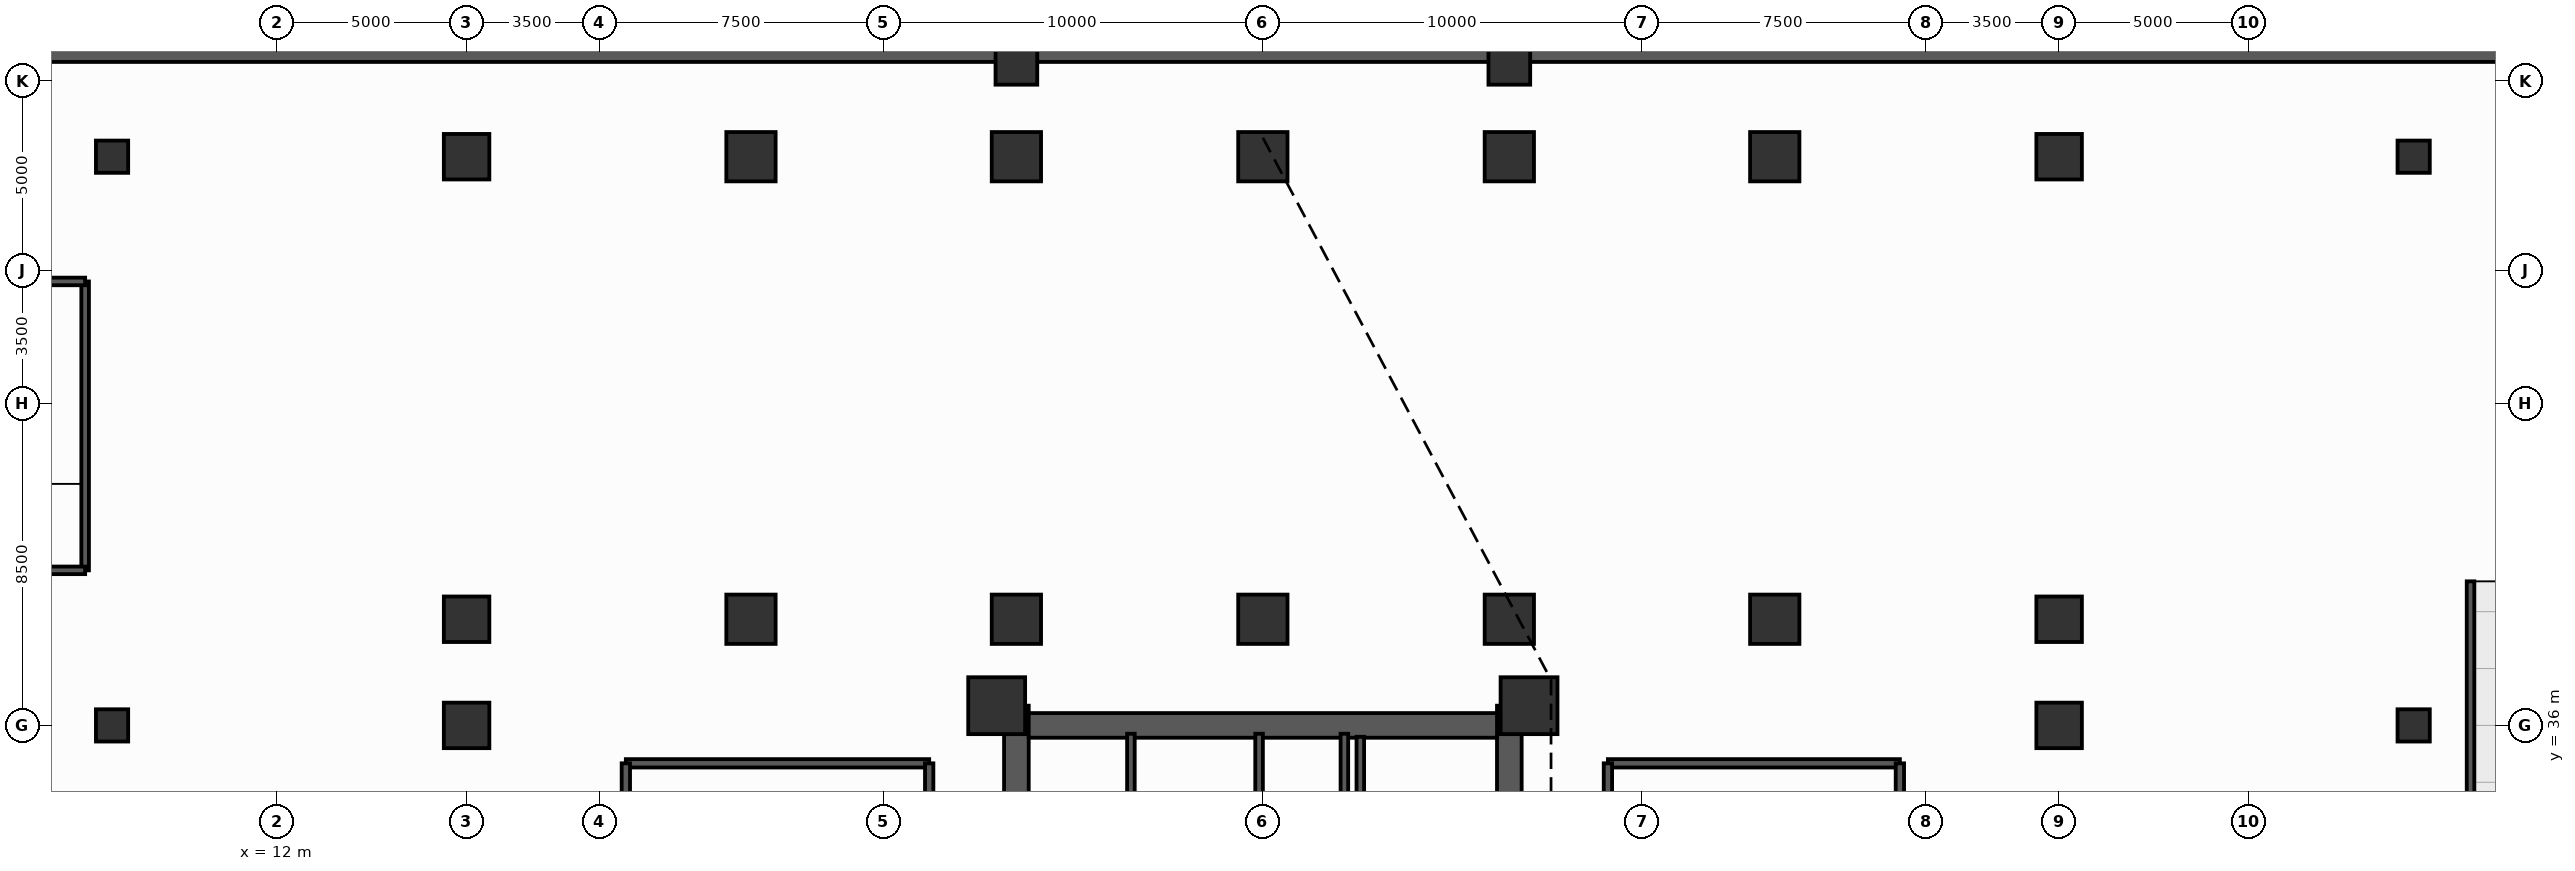
"""IFC4 building model, lengths in metres.
Left out: names, types, materials, properties, quantities, classifications, styles, units other than length and angle.
Written with IfcOpenShell. Run it as: python <this file> out.ifc"""

import sys

from ifc_helpers import new_model, si_unit, direction, frame, frame_2d, origin, origin_2d, place, context, subcontext, project, spatial, rectangle, circle, extrude, source, transform, mapped, element, fill, save


model = new_model("IFC4")
c1 = context("Model", 3, precision=1e-05, world=origin(), true_north=direction((0.0, 1.0)))
c2 = subcontext(c1, "Body", "Model", "MODEL_VIEW")
j1 = project(units=[si_unit("LENGTHUNIT", "METRE"), si_unit("PLANEANGLEUNIT", "RADIAN")], contexts=[c1])
p1 = place(None, origin())
s1 = spatial("IfcSite", under=j1, at=p1, CompositionType="ELEMENT")
p2 = place(p1, origin())
s2 = spatial("IfcBuilding", under=s1, at=p2, CompositionType="ELEMENT")
p3 = place(p2, frame((0.0, 0.0, -9.2)))
s3 = spatial("IfcBuildingStorey", under=s2, at=p3, CompositionType="ELEMENT", Elevation=-9.2)
p4 = place(p3, frame((75.75, 53.75, 0.0), z_axis=(0.0, 0.0, 1.0), x_axis=(-1.0, 0.0, 0.0)))
e1 = element("IfcWall", 1, at=p4, inside=s3, PredefinedType="USERDEFINED", context=c2, shape_type="SweptSolid", body=[
    extrude(rectangle(XDim=75.5, YDim=0.5, at=frame_2d((37.75, 0.0))), origin(), (0.0, 0.0, 1.0), 4.6),
])
p5 = place(p3, frame((31.5, 17.48, 0.0), z_axis=(0.0, 0.0, 1.0), x_axis=(0.0, 1.0, 0.0)))
e2 = element("IfcWall", 2, at=p5, inside=s3, PredefinedType="SHEAR", context=c2, shape_type="SweptSolid", body=[
    extrude(rectangle(XDim=19.04, YDim=0.65, at=frame_2d((9.52, 0.0))), origin(), (0.0, 0.0, 1.0), 4.6),
])
p6 = place(p5, frame((6.32, 0.0, 0.0)))
e3 = element("IfcOpeningElement", 3, at=p6, cuts=e2, PredefinedType="OPENING", context=c2, shape_type="SweptSolid", body=[
    extrude(rectangle(XDim=1.1, YDim=2.15, at=frame_2d((0.55, 1.075))), frame((0.0, 0.337, 0.0), z_axis=(0.0, -1.0, 0.0), x_axis=(1.0, 0.0, 0.0)), (0.0, 0.0, 1.0), 0.674),
])
p7 = place(p3, frame((44.5, 17.48, 0.0), z_axis=(0.0, 0.0, 1.0), x_axis=(0.0, 1.0, 0.0)))
e4 = element("IfcWall", 4, at=p7, inside=s3, PredefinedType="SHEAR", context=c2, shape_type="SweptSolid", body=[
    extrude(rectangle(XDim=19.04, YDim=0.65, at=frame_2d((9.52, 0.0))), origin(), (0.0, 0.0, 1.0), 4.6),
])
p8 = place(p7, frame((12.67, 0.0, 0.0), z_axis=(0.0, 0.0, 1.0), x_axis=(-1.0, 0.0, 0.0)))
e5 = element("IfcOpeningElement", 5, at=p8, cuts=e4, PredefinedType="OPENING", context=c2, shape_type="SweptSolid", body=[
    extrude(rectangle(XDim=1.1, YDim=2.15, at=frame_2d((0.55, 1.075))), frame((0.0, 0.337, 0.0), z_axis=(0.0, -1.0, 0.0), x_axis=(1.0, 0.0, 0.0)), (0.0, 0.0, 1.0), 0.674),
])
p9 = place(p3, frame((31.825, 36.0, 0.0), z_axis=(0.0, 0.0, 1.0), x_axis=(1.0, 0.0, 0.0)))
e6 = element("IfcWall", 6, at=p9, inside=s3, PredefinedType="SHEAR", context=c2, shape_type="SweptSolid", body=[
    extrude(rectangle(XDim=12.35, YDim=0.65, at=frame_2d((6.175, 0.0))), origin(), (0.0, 0.0, 1.0), 4.6),
])
p10 = place(p9, frame((5.125, 0.0, 0.0), z_axis=(0.0, 0.0, 1.0), x_axis=(-1.0, 0.0, 0.0)))
e7 = element("IfcOpeningElement", 7, at=p10, cuts=e6, PredefinedType="OPENING", context=c2, shape_type="SweptSolid", body=[
    extrude(rectangle(XDim=1.4, YDim=2.15, at=frame_2d((0.7, 1.075))), frame((0.0, 0.337, 0.0), z_axis=(0.0, -1.0, 0.0), x_axis=(1.0, 0.0, 0.0)), (0.0, 0.0, 1.0), 0.674),
])
m1 = source(origin(), c2, "Body", "SweptSolid", [
    extrude(rectangle(XDim=1.5, YDim=1.5, at=origin_2d()), origin(), (0.0, 0.0, 1.0), 4.6),
])
for number, where, z_axis, x_axis in (
    (8, (30.98, 36.52, 0.0), (0.0, 0.0, 1.0), (1.0, 0.0, 0.0)),
    (9, (45.02, 36.52, 0.0), (0.0, 0.0, 1.0), (1.0, 0.0, 0.0)),
):
    element("IfcColumn", number, at=place(p3, frame(where, z_axis=z_axis, x_axis=x_axis)), inside=s3, PredefinedType="COLUMN", context=c2, shape_type="MappedRepresentation", body=[
        mapped(m1, transform((0.0, 0.0, 0.0), scale=1.0)),
    ])
m2 = source(origin(), c2, "Body", "SweptSolid", [
    extrude(circle(Radius=0.425, at=origin_2d()), origin(), (0.0, 0.0, 1.0), 4.6),
])
for number, where, z_axis, x_axis in (
    (10, (7.65, 36.0, 0.0), (0.0, 0.0, 1.0), (1.0, 0.0, 0.0)),
    (11, (68.35, 36.0, 0.0), (0.0, 0.0, 1.0), (1.0, 0.0, 0.0)),
    (12, (7.65, 51.0, 0.0), (0.0, 0.0, 1.0), (1.0, 0.0, 0.0)),
    (13, (68.35, 51.0, 0.0), (0.0, 0.0, 1.0), (1.0, 0.0, 0.0)),
):
    element("IfcColumn", number, at=place(p3, frame(where, z_axis=z_axis, x_axis=x_axis)), inside=s3, PredefinedType="COLUMN", context=c2, shape_type="MappedRepresentation", body=[
        mapped(m2, transform((0.0, 0.0, 0.0), scale=1.0)),
    ])
m3 = source(origin(), c2, "Body", "SweptSolid", [
    extrude(rectangle(XDim=1.2, YDim=1.2, at=origin_2d()), origin(), (0.0, 0.0, 1.0), 4.6),
])
for number, where, z_axis, x_axis in (
    (14, (17.0, 36.0, 0.0), (0.0, 0.0, 1.0), (1.0, 0.0, 0.0)),
    (15, (59.0, 36.0, 0.0), (0.0, 0.0, 1.0), (1.0, 0.0, 0.0)),
    (16, (17.0, 38.8, 0.0), (0.0, 0.0, 1.0), (1.0, 0.0, 0.0)),
    (17, (59.0, 38.8, 0.0), (0.0, 0.0, 1.0), (1.0, 0.0, 0.0)),
    (18, (17.0, 51.0, 0.0), (0.0, 0.0, 1.0), (1.0, 0.0, 0.0)),
    (19, (59.0, 51.0, 0.0), (0.0, 0.0, 1.0), (1.0, 0.0, 0.0)),
):
    element("IfcColumn", number, at=place(p3, frame(where, z_axis=z_axis, x_axis=x_axis)), inside=s3, PredefinedType="COLUMN", context=c2, shape_type="MappedRepresentation", body=[
        mapped(m3, transform((0.0, 0.0, 0.0), scale=1.0)),
    ])
m4 = source(origin(), c2, "Body", "SweptSolid", [
    extrude(rectangle(XDim=1.3, YDim=1.3, at=origin_2d()), origin(), (0.0, 0.0, 1.0), 4.6),
])
for number, where, z_axis, x_axis in (
    (20, (24.5, 38.8, 0.0), (0.0, 0.0, 1.0), (1.0, 0.0, 0.0)),
    (21, (24.5, 51.0, 0.0), (0.0, 0.0, 1.0), (1.0, 0.0, 0.0)),
    (22, (31.5, 38.8, 0.0), (0.0, 0.0, 1.0), (1.0, 0.0, 0.0)),
    (23, (31.5, 51.0, 0.0), (0.0, 0.0, 1.0), (1.0, 0.0, 0.0)),
):
    element("IfcColumn", number, at=place(p3, frame(where, z_axis=z_axis, x_axis=x_axis)), inside=s3, PredefinedType="COLUMN", context=c2, shape_type="MappedRepresentation", body=[
        mapped(m4, transform((0.0, 0.0, 0.0), scale=1.0)),
    ])
m5 = source(origin(), c2, "Body", "SweptSolid", [
    extrude(rectangle(XDim=1.1, YDim=1.1, at=origin_2d()), origin(), (0.0, 0.0, 1.0), 4.6),
])
p11 = place(p3, frame((31.5, 53.45, 0.0), z_axis=(0.0, 0.0, 1.0), x_axis=(1.0, 0.0, 0.0)))
e24 = element("IfcColumn", 24, at=p11, inside=s3, PredefinedType="COLUMN", context=c2, shape_type="MappedRepresentation", body=[
    mapped(m5, transform((0.0, 0.0, 0.0), scale=1.0)),
])
for number, where, z_axis, x_axis in (
    (25, (38.0, 38.8, 0.0), (0.0, 0.0, 1.0), (1.0, 0.0, 0.0)),
    (26, (38.0, 51.0, 0.0), (0.0, 0.0, 1.0), (1.0, 0.0, 0.0)),
    (27, (44.5, 38.8, 0.0), (0.0, 0.0, 1.0), (1.0, 0.0, 0.0)),
    (28, (44.5, 51.0, 0.0), (0.0, 0.0, 1.0), (1.0, 0.0, 0.0)),
):
    element("IfcColumn", number, at=place(p3, frame(where, z_axis=z_axis, x_axis=x_axis)), inside=s3, PredefinedType="COLUMN", context=c2, shape_type="MappedRepresentation", body=[
        mapped(m4, transform((0.0, 0.0, 0.0), scale=1.0)),
    ])
p12 = place(p3, frame((44.5, 53.45, 0.0), z_axis=(0.0, 0.0, 1.0), x_axis=(1.0, 0.0, 0.0)))
e29 = element("IfcColumn", 29, at=p12, inside=s3, PredefinedType="COLUMN", context=c2, shape_type="MappedRepresentation", body=[
    mapped(m5, transform((0.0, 0.0, 0.0), scale=1.0)),
])
for number, where, z_axis, x_axis in (
    (30, (51.5, 38.8, 0.0), (0.0, 0.0, 1.0), (1.0, 0.0, 0.0)),
    (31, (51.5, 51.0, 0.0), (0.0, 0.0, 1.0), (1.0, 0.0, 0.0)),
):
    element("IfcColumn", number, at=place(p3, frame(where, z_axis=z_axis, x_axis=x_axis)), inside=s3, PredefinedType="COLUMN", context=c2, shape_type="MappedRepresentation", body=[
        mapped(m4, transform((0.0, 0.0, 0.0), scale=1.0)),
    ])
p13 = place(p3, frame((40.15, 31.8, 0.0), z_axis=(0.0, 0.0, 1.0), x_axis=(0.0, 1.0, 0.0)))
e32 = element("IfcWall", 32, at=p13, inside=s3, PredefinedType="PARTITIONING", context=c2, shape_type="SweptSolid", body=[
    extrude(rectangle(XDim=3.98, YDim=0.2, at=frame_2d((1.99, 0.0))), origin(), (0.0, 0.0, 1.0), 4.3),
])
p14 = place(p3, frame((40.57, 28.65, 0.0), z_axis=(0.0, 0.0, 1.0), x_axis=(0.0, 1.0, 0.0)))
e33 = element("IfcWall", 33, at=p14, inside=s3, PredefinedType="SOLIDWALL", context=c2, shape_type="SweptSolid", body=[
    extrude(rectangle(XDim=7.05, YDim=0.2, at=frame_2d((3.525, 0.0))), origin(), (0.0, 0.0, 1.0), 4.3),
])
p15 = place(p3, frame((34.52, 25.44, 0.0), z_axis=(0.0, 0.0, 1.0), x_axis=(0.0, 1.0, 0.0)))
e34 = element("IfcWall", 34, at=p15, inside=s3, PredefinedType="PARTITIONING", context=c2, shape_type="SweptSolid", body=[
    extrude(rectangle(XDim=10.34, YDim=0.2, at=frame_2d((5.17, 0.0))), origin(), (0.0, 0.0, 1.0), 4.3),
])
p16 = place(p15, frame((0.32, 0.0, 0.0)))
e35 = element("IfcOpeningElement", 35, at=p16, cuts=e34, PredefinedType="OPENING", context=c2, shape_type="SweptSolid", body=[
    extrude(rectangle(XDim=1.0, YDim=2.15, at=frame_2d((0.5, 1.075))), frame((0.0, 0.112, 0.0), z_axis=(0.0, -1.0, 0.0), x_axis=(1.0, 0.0, 0.0)), (0.0, 0.0, 1.0), 0.224),
])
p17 = place(p15, frame((1.71, 0.0, 0.0)))
e36 = element("IfcOpeningElement", 36, at=p17, cuts=e34, PredefinedType="OPENING", context=c2, shape_type="SweptSolid", body=[
    extrude(rectangle(XDim=1.0, YDim=2.15, at=frame_2d((0.5, 1.075))), frame((0.0, 0.112, 0.0), z_axis=(0.0, -1.0, 0.0), x_axis=(1.0, 0.0, 0.0)), (0.0, 0.0, 1.0), 0.224),
])
p18 = place(p15, frame((3.535, 0.0, 0.0)))
e37 = element("IfcOpeningElement", 37, at=p18, cuts=e34, PredefinedType="OPENING", context=c2, shape_type="SweptSolid", body=[
    extrude(rectangle(XDim=1.0, YDim=2.15, at=frame_2d((0.5, 1.075))), frame((0.0, 0.112, 0.0), z_axis=(0.0, -1.0, 0.0), x_axis=(1.0, 0.0, 0.0)), (0.0, 0.0, 1.0), 0.224),
])
p19 = place(p15, frame((5.135, 0.0, 0.0)))
e38 = element("IfcOpeningElement", 38, at=p19, cuts=e34, PredefinedType="OPENING", context=c2, shape_type="SweptSolid", body=[
    extrude(rectangle(XDim=1.0, YDim=2.15, at=frame_2d((0.5, 1.075))), frame((0.0, 0.112, 0.0), z_axis=(0.0, -1.0, 0.0), x_axis=(1.0, 0.0, 0.0)), (0.0, 0.0, 1.0), 0.224),
])
p20 = place(p15, frame((7.01, 0.0, 0.0)))
e39 = element("IfcOpeningElement", 39, at=p20, cuts=e34, PredefinedType="OPENING", context=c2, shape_type="SweptSolid", body=[
    extrude(rectangle(XDim=1.0, YDim=2.15, at=frame_2d((0.5, 1.075))), frame((0.0, 0.112, 0.0), z_axis=(0.0, -1.0, 0.0), x_axis=(1.0, 0.0, 0.0)), (0.0, 0.0, 1.0), 0.224),
])
p21 = place(p15, frame((8.76, 0.0, 0.0)))
e40 = element("IfcOpeningElement", 40, at=p21, cuts=e34, PredefinedType="OPENING", context=c2, shape_type="SweptSolid", body=[
    extrude(rectangle(XDim=1.0, YDim=2.15, at=frame_2d((0.5, 1.075))), frame((0.0, 0.112, 0.0), z_axis=(0.0, -1.0, 0.0), x_axis=(1.0, 0.0, 0.0)), (0.0, 0.0, 1.0), 0.224),
])
p22 = place(p3, frame((37.9, 25.44, 0.0), z_axis=(0.0, 0.0, 1.0), x_axis=(0.0, 1.0, 0.0)))
e41 = element("IfcWall", 41, at=p22, inside=s3, PredefinedType="PARTITIONING", context=c2, shape_type="SweptSolid", body=[
    extrude(rectangle(XDim=10.34, YDim=0.2, at=frame_2d((5.17, 0.0))), origin(), (0.0, 0.0, 1.0), 4.3),
])
p23 = place(p22, frame((0.32, 0.0, 0.0)))
e42 = element("IfcOpeningElement", 42, at=p23, cuts=e41, PredefinedType="OPENING", context=c2, shape_type="SweptSolid", body=[
    extrude(rectangle(XDim=1.0, YDim=2.15, at=frame_2d((0.5, 1.075))), frame((0.0, 0.112, 0.0), z_axis=(0.0, -1.0, 0.0), x_axis=(1.0, 0.0, 0.0)), (0.0, 0.0, 1.0), 0.224),
])
p24 = place(p22, frame((1.71, 0.0, 0.0)))
e43 = element("IfcOpeningElement", 43, at=p24, cuts=e41, PredefinedType="OPENING", context=c2, shape_type="SweptSolid", body=[
    extrude(rectangle(XDim=1.0, YDim=2.15, at=frame_2d((0.5, 1.075))), frame((0.0, 0.112, 0.0), z_axis=(0.0, -1.0, 0.0), x_axis=(1.0, 0.0, 0.0)), (0.0, 0.0, 1.0), 0.224),
])
p25 = place(p22, frame((3.51, 0.0, 0.0)))
e44 = element("IfcOpeningElement", 44, at=p25, cuts=e41, PredefinedType="OPENING", context=c2, shape_type="SweptSolid", body=[
    extrude(rectangle(XDim=1.0, YDim=2.15, at=frame_2d((0.5, 1.075))), frame((0.0, 0.112, 0.0), z_axis=(0.0, -1.0, 0.0), x_axis=(1.0, 0.0, 0.0)), (0.0, 0.0, 1.0), 0.224),
])
p26 = place(p22, frame((5.01, 0.0, 0.0)))
e45 = element("IfcOpeningElement", 45, at=p26, cuts=e41, PredefinedType="OPENING", context=c2, shape_type="SweptSolid", body=[
    extrude(rectangle(XDim=1.0, YDim=2.15, at=frame_2d((0.5, 1.075))), frame((0.0, 0.112, 0.0), z_axis=(0.0, -1.0, 0.0), x_axis=(1.0, 0.0, 0.0)), (0.0, 0.0, 1.0), 0.224),
])
p27 = place(p22, frame((6.86, 0.0, 0.0)))
e46 = element("IfcOpeningElement", 46, at=p27, cuts=e41, PredefinedType="OPENING", context=c2, shape_type="SweptSolid", body=[
    extrude(rectangle(XDim=1.0, YDim=2.15, at=frame_2d((0.5, 1.075))), frame((0.0, 0.112, 0.0), z_axis=(0.0, -1.0, 0.0), x_axis=(1.0, 0.0, 0.0)), (0.0, 0.0, 1.0), 0.224),
])
p28 = place(p22, frame((8.71, 0.0, 0.0)))
e47 = element("IfcOpeningElement", 47, at=p28, cuts=e41, PredefinedType="OPENING", context=c2, shape_type="SweptSolid", body=[
    extrude(rectangle(XDim=1.0, YDim=2.15, at=frame_2d((0.5, 1.075))), frame((0.0, 0.112, 0.0), z_axis=(0.0, -1.0, 0.0), x_axis=(1.0, 0.0, 0.0)), (0.0, 0.0, 1.0), 0.224),
])
p29 = place(p3, frame((6.94, 40.09, 0.0), z_axis=(0.0, 0.0, 1.0), x_axis=(0.0, 1.0, 0.0)))
e48 = element("IfcWall", 48, at=p29, inside=s3, PredefinedType="SOLIDWALL", context=c2, shape_type="SweptSolid", body=[
    extrude(rectangle(XDim=7.62, YDim=0.2, at=frame_2d((3.81, 0.0))), origin(), (0.0, 0.0, 1.0), 4.3),
])
p30 = place(p29, frame((7.15, 0.0, 0.0), z_axis=(0.0, 0.0, 1.0), x_axis=(-1.0, 0.0, 0.0)))
e49 = element("IfcOpeningElement", 49, at=p30, cuts=e48, PredefinedType="OPENING", context=c2, shape_type="SweptSolid", body=[
    extrude(rectangle(XDim=1.1, YDim=2.15, at=frame_2d((0.55, 1.075))), frame((0.0, 0.112, 0.0), z_axis=(0.0, -1.0, 0.0), x_axis=(1.0, 0.0, 0.0)), (0.0, 0.0, 1.0), 0.224),
])
for number, where, z_axis, x_axis in (
    (50, (3.24, 40.09, 0.0), (0.0, 0.0, 1.0), (1.0, 0.0, 0.0)),
    (51, (3.24, 47.71, 0.0), (0.0, 0.0, 1.0), (1.0, 0.0, 0.0)),
):
    element("IfcWall", number, at=place(p3, frame(where, z_axis=z_axis, x_axis=x_axis)), inside=s3, PredefinedType="SOLIDWALL", context=c2, shape_type="SweptSolid", body=[
        extrude(rectangle(XDim=3.7, YDim=0.2, at=frame_2d((1.85, 0.0))), origin(), (0.0, 0.0, 1.0), 4.3),
    ])
p31 = place(p3, frame((69.85, 8.2, 0.0), z_axis=(0.0, 0.0, 1.0), x_axis=(0.0, 1.0, 0.0)))
e52 = element("IfcWall", 52, at=p31, inside=s3, PredefinedType="PARTITIONING", context=c2, shape_type="SweptSolid", body=[
    extrude(rectangle(XDim=31.6, YDim=0.2, at=frame_2d((15.8, 0.0))), origin(), (0.0, 0.0, 1.0), 4.3),
])
p32 = place(p3, frame((21.2, 35.0, 0.0), z_axis=(0.0, 0.0, 1.0), x_axis=(1.0, 0.0, 0.0)))
e53 = element("IfcWall", 53, at=p32, inside=s3, PredefinedType="PARTITIONING", context=c2, shape_type="SweptSolid", body=[
    extrude(rectangle(XDim=8.0, YDim=0.22, at=frame_2d((4.0, 0.0))), origin(), (0.0, 0.0, 1.0), 4.3),
])
p33 = place(p3, frame((21.2, 27.4, 0.0), z_axis=(0.0, 0.0, 1.0), x_axis=(0.0, 1.0, 0.0)))
e54 = element("IfcWall", 54, at=p33, inside=s3, PredefinedType="PARTITIONING", context=c2, shape_type="SweptSolid", body=[
    extrude(rectangle(XDim=7.6, YDim=0.22, at=frame_2d((3.8, 0.0))), origin(), (0.0, 0.0, 1.0), 4.3),
])
p34 = place(p33, frame((3.25, 0.0, 0.0)))
e55 = element("IfcOpeningElement", 55, at=p34, cuts=e54, PredefinedType="OPENING", context=c2, shape_type="SweptSolid", body=[
    extrude(rectangle(XDim=1.1, YDim=2.15, at=frame_2d((0.55, 1.075))), frame((0.0, 0.122, 0.0), z_axis=(0.0, -1.0, 0.0), x_axis=(1.0, 0.0, 0.0)), (0.0, 0.0, 1.0), 0.244),
])
p35 = place(p3, frame((29.2, 27.4, 0.0), z_axis=(0.0, 0.0, 1.0), x_axis=(0.0, 1.0, 0.0)))
e56 = element("IfcWall", 56, at=p35, inside=s3, PredefinedType="PARTITIONING", context=c2, shape_type="SweptSolid", body=[
    extrude(rectangle(XDim=7.6, YDim=0.22, at=frame_2d((3.8, 0.0))), origin(), (0.0, 0.0, 1.0), 4.3),
])
p36 = place(p3, frame((47.1, 35.0, 0.0), z_axis=(0.0, 0.0, 1.0), x_axis=(1.0, 0.0, 0.0)))
e57 = element("IfcWall", 57, at=p36, inside=s3, PredefinedType="PARTITIONING", context=c2, shape_type="SweptSolid", body=[
    extrude(rectangle(XDim=7.7, YDim=0.22, at=frame_2d((3.85, 0.0))), origin(), (0.0, 0.0, 1.0), 4.3),
])
p37 = place(p3, frame((47.1, 27.4, 0.0), z_axis=(0.0, 0.0, 1.0), x_axis=(0.0, 1.0, 0.0)))
e58 = element("IfcWall", 58, at=p37, inside=s3, PredefinedType="PARTITIONING", context=c2, shape_type="SweptSolid", body=[
    extrude(rectangle(XDim=7.6, YDim=0.22, at=frame_2d((3.8, 0.0))), origin(), (0.0, 0.0, 1.0), 4.3),
])
p38 = place(p3, frame((54.8, 27.4, 0.0), z_axis=(0.0, 0.0, 1.0), x_axis=(0.0, 1.0, 0.0)))
e59 = element("IfcWall", 59, at=p38, inside=s3, PredefinedType="PARTITIONING", context=c2, shape_type="SweptSolid", body=[
    extrude(rectangle(XDim=7.6, YDim=0.22, at=frame_2d((3.8, 0.0))), origin(), (0.0, 0.0, 1.0), 4.3),
])
p39 = place(p38, frame((3.25, 0.0, 0.0)))
e60 = element("IfcOpeningElement", 60, at=p39, cuts=e59, PredefinedType="OPENING", context=c2, shape_type="SweptSolid", body=[
    extrude(rectangle(XDim=1.1, YDim=2.15, at=frame_2d((0.55, 1.075))), frame((0.0, 0.122, 0.0), z_axis=(0.0, -1.0, 0.0), x_axis=(1.0, 0.0, 0.0)), (0.0, 0.0, 1.0), 0.244),
])
m6 = source(origin(), c2, "Body", "SweptSolid", [
    extrude(rectangle(XDim=1.4, YDim=2.15, at=frame_2d((0.7, 1.075))), frame((0.0, 0.025, 0.0), z_axis=(0.0, -1.0, 0.0), x_axis=(1.0, 0.0, 0.0)), (0.0, 0.0, 1.0), 0.05),
])
p40 = place(p10, origin())
e61 = element("IfcDoor", 61, at=p40, inside=s3, OperationType="SINGLE_SWING_RIGHT", PredefinedType="DOOR", context=c2, shape_type="MappedRepresentation", body=[
    mapped(m6, transform((0.0, 0.0, 0.0), scale=1.0)),
])
fill(e7, e61)
m7 = source(origin(), c2, "Body", "SweptSolid", [
    extrude(rectangle(XDim=1.0, YDim=2.15, at=frame_2d((0.5, 1.075))), frame((0.0, 0.025, 0.0), z_axis=(0.0, -1.0, 0.0), x_axis=(1.0, 0.0, 0.0)), (0.0, 0.0, 1.0), 0.05),
])
p41 = place(p21, origin())
e62 = element("IfcDoor", 62, at=p41, inside=s3, OperationType="DOUBLE_DOOR_SLIDING", PredefinedType="DOOR", context=c2, shape_type="MappedRepresentation", body=[
    mapped(m7, transform((0.0, 0.0, 0.0), scale=1.0)),
])
fill(e40, e62)
p42 = place(p28, origin())
e63 = element("IfcDoor", 63, at=p42, inside=s3, OperationType="DOUBLE_DOOR_SLIDING", PredefinedType="DOOR", context=c2, shape_type="MappedRepresentation", body=[
    mapped(m7, transform((0.0, 0.0, 0.0), scale=1.0)),
])
fill(e47, e63)
m8 = source(origin(), c2, "Body", "SweptSolid", [
    extrude(rectangle(XDim=1.1, YDim=2.15, at=frame_2d((0.55, 1.075))), frame((0.0, 0.025, 0.0), z_axis=(0.0, -1.0, 0.0), x_axis=(1.0, 0.0, 0.0)), (0.0, 0.0, 1.0), 0.05),
])
p43 = place(p30, origin())
e64 = element("IfcDoor", 64, at=p43, inside=s3, OperationType="SINGLE_SWING_RIGHT", PredefinedType="DOOR", context=c2, shape_type="MappedRepresentation", body=[
    mapped(m8, transform((0.0, 0.0, 0.0), scale=1.0)),
])
fill(e49, e64)
save(model, sys.argv[1])
